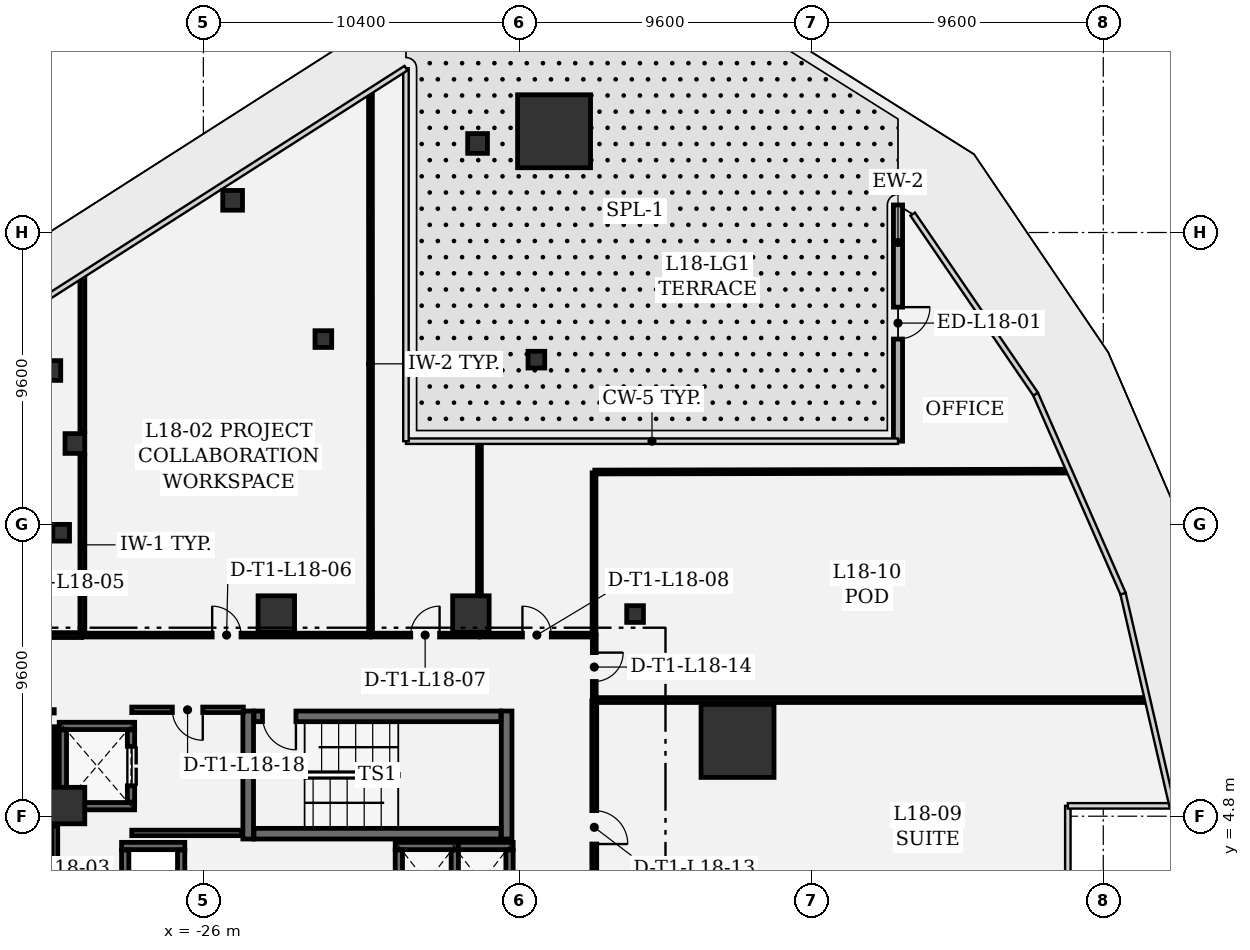
"""IFC4 building model, lengths in metres.
Left out: names, types, materials, properties, quantities, classifications, styles, units other than length and angle.
Written with IfcOpenShell. Run it as: python <this file> out.ifc"""

import sys

from ifc_helpers import new_model, si_unit, direction, frame, frame_2d, origin, origin_2d, place, context, subcontext, project, spatial, rectangle, extrude, element, fill, save


model = new_model("IFC4")
c1 = context("Model", 3, precision=1e-05, world=origin(), true_north=direction((0.0, 1.0)))
c2 = subcontext(c1, "Body", "Model", "MODEL_VIEW")
j1 = project(units=[si_unit("LENGTHUNIT", "METRE"), si_unit("PLANEANGLEUNIT", "RADIAN")], contexts=[c1])
p1 = place(None, origin())
s1 = spatial("IfcSite", under=j1, at=p1, CompositionType="ELEMENT")
p2 = place(p1, origin())
s2 = spatial("IfcBuilding", under=s1, at=p2, CompositionType="ELEMENT")
p3 = place(p2, frame((0.0, 0.0, 82.8)))
s3 = spatial("IfcBuildingStorey", under=s2, at=p3, CompositionType="ELEMENT", Elevation=82.8)
for number, where, z_axis, x_axis in (
    (1, (-8.43, 7.276, 0.0), (0.0, 0.0, 1.0), (1.0, 0.0, 0.0)),
    (2, (-14.464, 27.331, 0.0), (0.0, 0.0, 1.0), (1.0, 0.0, 0.0)),
):
    element("IfcColumn", number, at=place(p3, frame(where, z_axis=z_axis, x_axis=x_axis)), inside=s3, PredefinedType="COLUMN", context=c2, shape_type="SweptSolid", body=[
        extrude(rectangle(XDim=2.4, YDim=2.4, at=origin_2d()), origin(), (0.0, 0.0, 1.0), 4.2),
    ])
for number, where, z_axis, x_axis in (
    (3, (-23.6, 11.45, 0.0), (0.0, 0.0, 1.0), (1.0, 0.0, 0.0)),
    (4, (-17.2, 11.45, 0.0), (0.0, 0.0, 1.0), (1.0, 0.0, 0.0)),
    (5, (-30.5, 5.15, 0.0), (0.0, 0.0, 1.0), (1.0, 0.0, 0.0)),
):
    element("IfcColumn", number, at=place(p3, frame(where, z_axis=z_axis, x_axis=x_axis)), inside=s3, PredefinedType="COLUMN", context=c2, shape_type="SweptSolid", body=[
        extrude(rectangle(XDim=1.2, YDim=1.2, at=origin_2d()), origin(), (0.0, 0.0, 1.0), 4.2),
    ])
for number, where, z_axis, x_axis in (
    (6, (-25.038, 25.059, 0.0), (0.0, 0.0, 1.0), (1.0, 0.0, 0.0)),
    (7, (-31.016, 19.46, 0.0), (0.0, 0.0, 1.0), (1.0, 0.0, 0.0)),
    (8, (-16.981, 26.929, 0.0), (0.0, 0.0, 1.0), (1.0, 0.0, 0.0)),
    (9, (-30.225, 17.06, 0.0), (0.0, 0.0, 1.0), (1.0, 0.0, 0.0)),
):
    element("IfcColumn", number, at=place(p3, frame(where, z_axis=z_axis, x_axis=x_axis)), inside=s3, PredefinedType="COLUMN", context=c2, shape_type="SweptSolid", body=[
        extrude(rectangle(XDim=0.65, YDim=0.65, at=origin_2d()), origin(), (0.0, 0.0, 1.0), 4.2),
    ])
for number, where, z_axis, x_axis in (
    (10, (-22.053, 20.495, 0.0), (0.0, 0.0, 1.0), (1.0, 0.0, 0.0)),
    (11, (-30.677, 14.124, 0.0), (0.0, 0.0, 1.0), (1.0, 0.0, 0.0)),
    (12, (-15.046, 19.818, 0.0), (0.0, 0.0, 1.0), (1.0, 0.0, 0.0)),
    (13, (-11.8, 11.45, 0.0), (0.0, 0.0, 1.0), (1.0, 0.0, 0.0)),
):
    element("IfcColumn", number, at=place(p3, frame(where, z_axis=z_axis, x_axis=x_axis)), inside=s3, PredefinedType="COLUMN", context=c2, shape_type="SweptSolid", body=[
        extrude(rectangle(XDim=0.55, YDim=0.55, at=origin_2d()), origin(), (0.0, 0.0, 1.0), 4.2),
    ])
p4 = place(p3, frame((-3.152, 24.906, 0.0), z_axis=(0.0, 0.0, 1.0), x_axis=(0.0, -1.0, 0.0)))
e14 = element("IfcWall", 14, at=p4, inside=s3, PredefinedType="SOLIDWALL", context=c2, shape_type="SweptSolid", body=[
    extrude(rectangle(XDim=7.77, YDim=0.3, at=frame_2d((3.885, 0.0))), origin(), (0.0, 0.0, 1.0), 3.92),
])
p5 = place(p4, frame((3.36, 0.0, 0.0)))
e15 = element("IfcOpeningElement", 15, at=p5, cuts=e14, PredefinedType="OPENING", context=c2, shape_type="SweptSolid", body=[
    extrude(rectangle(XDim=1.05, YDim=2.2, at=frame_2d((0.525, 1.1))), frame((0.0, 0.16, 0.0), z_axis=(0.0, -1.0, 0.0), x_axis=(1.0, 0.0, 0.0)), (0.0, 0.0, 1.0), 0.32),
])
for number, where, z_axis, x_axis in (
    (16, (-24.525, 8.26, 0.0), (0.0, 0.0, 1.0), (0.0, -1.0, 0.0)),
    (17, (-16.025, 4.05, 0.0), (0.0, 0.0, 1.0), (0.0, 1.0, 0.0)),
):
    element("IfcWall", number, at=place(p3, frame(where, z_axis=z_axis, x_axis=x_axis)), inside=s3, PredefinedType="SHEAR", context=c2, shape_type="SweptSolid", body=[
        extrude(rectangle(XDim=4.21, YDim=0.35, at=frame_2d((2.105, 0.0))), origin(), (0.0, 0.0, 1.0), 3.92),
    ])
p6 = place(p3, frame((-24.335, 4.225, 0.0), z_axis=(0.0, 0.0, 1.0), x_axis=(1.0, 0.0, 0.0)))
e18 = element("IfcWall", 18, at=p6, inside=s3, PredefinedType="SHEAR", context=c2, shape_type="SweptSolid", body=[
    extrude(rectangle(XDim=8.12, YDim=0.35, at=frame_2d((4.06, 0.0))), origin(), (0.0, 0.0, 1.0), 3.92),
])
p7 = place(p3, frame((-16.215, 8.085, 0.0), z_axis=(0.0, 0.0, 1.0), x_axis=(-1.0, 0.0, 0.0)))
e19 = element("IfcWall", 19, at=p7, inside=s3, PredefinedType="SHEAR", context=c2, shape_type="SweptSolid", body=[
    extrude(rectangle(XDim=8.12, YDim=0.35, at=frame_2d((4.06, 0.0))), origin(), (0.0, 0.0, 1.0), 3.92),
])
p8 = place(p7, frame((6.74, 0.0, 0.0)))
e20 = element("IfcOpeningElement", 20, at=p8, cuts=e19, PredefinedType="OPENING", context=c2, shape_type="SweptSolid", body=[
    extrude(rectangle(XDim=1.1, YDim=2.2, at=frame_2d((0.55, 1.1))), frame((0.0, 0.185, 0.0), z_axis=(0.0, -1.0, 0.0), x_axis=(1.0, 0.0, 0.0)), (0.0, 0.0, 1.0), 0.37),
])
for number, where, z_axis, x_axis in (
    (21, (-28.26, 5.13, 0.0), (0.0, 0.0, 1.0), (-1.0, 0.0, 0.0)),
    (22, (-30.74, 7.77, 0.0), (0.0, 0.0, 1.0), (1.0, 0.0, 0.0)),
):
    element("IfcWall", number, at=place(p3, frame(where, z_axis=z_axis, x_axis=x_axis)), inside=s3, PredefinedType="SHEAR", context=c2, shape_type="SweptSolid", body=[
        extrude(rectangle(XDim=2.48, YDim=0.24, at=frame_2d((1.24, 0.0))), origin(), (0.0, 0.0, 1.0), 3.92),
    ])
p9 = place(p3, frame((-30.62, 5.262, 0.0), z_axis=(0.0, 0.0, 1.0), x_axis=(0.0, 1.0, 0.0)))
e23 = element("IfcWall", 23, at=p9, inside=s3, PredefinedType="SHEAR", context=c2, shape_type="SweptSolid", body=[
    extrude(rectangle(XDim=2.376, YDim=0.24, at=frame_2d((1.188, 0.0))), origin(), (0.0, 0.0, 1.0), 3.92),
])
p10 = place(p3, frame((-28.38, 7.638, 0.0), z_axis=(0.0, 0.0, 1.0), x_axis=(0.0, -1.0, 0.0)))
e24 = element("IfcWall", 24, at=p10, inside=s3, PredefinedType="SHEAR", context=c2, shape_type="SweptSolid", body=[
    extrude(rectangle(XDim=2.376, YDim=0.24, at=frame_2d((1.188, 0.0))), origin(), (0.0, 0.0, 1.0), 3.92),
])
p11 = place(p10, frame((0.538, 0.0, 0.0)))
e25 = element("IfcOpeningElement", 25, at=p11, cuts=e24, PredefinedType="OPENING", context=c2, shape_type="SweptSolid", body=[
    extrude(rectangle(XDim=1.3, YDim=2.3, at=frame_2d((0.65, 1.15))), frame((0.0, 0.13, 0.0), z_axis=(0.0, -1.0, 0.0), x_axis=(1.0, 0.0, 0.0)), (0.0, 0.0, 1.0), 0.26),
])
p12 = place(p3, frame((-28.69, 3.82, 0.0), z_axis=(0.0, 0.0, 1.0), x_axis=(1.0, 0.0, 0.0)))
e26 = element("IfcWall", 26, at=p12, inside=s3, PredefinedType="SHEAR", context=c2, shape_type="SweptSolid", body=[
    extrude(rectangle(XDim=2.08, YDim=0.24, at=frame_2d((1.04, 0.0))), origin(), (0.0, 0.0, 1.0), 3.92),
])
for number, where, z_axis, x_axis in (
    (27, (-28.57, 1.562, 0.0), (0.0, 0.0, 1.0), (0.0, 1.0, 0.0)),
    (28, (-26.73, 3.688, 0.0), (0.0, 0.0, 1.0), (0.0, -1.0, 0.0)),
):
    element("IfcWall", number, at=place(p3, frame(where, z_axis=z_axis, x_axis=x_axis)), inside=s3, PredefinedType="SHEAR", context=c2, shape_type="SweptSolid", body=[
        extrude(rectangle(XDim=2.126, YDim=0.24, at=frame_2d((1.063, 0.0))), origin(), (0.0, 0.0, 1.0), 3.92),
    ])
p13 = place(p3, frame((-19.69, 3.82, 0.0), z_axis=(0.0, 0.0, 1.0), x_axis=(1.0, 0.0, 0.0)))
e29 = element("IfcWall", 29, at=p13, inside=s3, PredefinedType="SHEAR", context=c2, shape_type="SweptSolid", body=[
    extrude(rectangle(XDim=2.08, YDim=0.24, at=frame_2d((1.04, 0.0))), origin(), (0.0, 0.0, 1.0), 3.92),
])
for number, where, z_axis, x_axis in (
    (30, (-19.57, 1.562, 0.0), (0.0, 0.0, 1.0), (0.0, 1.0, 0.0)),
    (31, (-17.73, 3.688, 0.0), (0.0, 0.0, 1.0), (0.0, -1.0, 0.0)),
):
    element("IfcWall", number, at=place(p3, frame(where, z_axis=z_axis, x_axis=x_axis)), inside=s3, PredefinedType="SHEAR", context=c2, shape_type="SweptSolid", body=[
        extrude(rectangle(XDim=2.126, YDim=0.24, at=frame_2d((1.063, 0.0))), origin(), (0.0, 0.0, 1.0), 3.92),
    ])
p14 = place(p3, frame((-17.61, 3.82, 0.0), z_axis=(0.0, 0.0, 1.0), x_axis=(1.0, 0.0, 0.0)))
e32 = element("IfcWall", 32, at=p14, inside=s3, PredefinedType="SHEAR", context=c2, shape_type="SweptSolid", body=[
    extrude(rectangle(XDim=1.8, YDim=0.24, at=frame_2d((0.9, 0.0))), origin(), (0.0, 0.0, 1.0), 3.92),
])
p15 = place(p3, frame((-15.93, 3.688, 0.0), z_axis=(0.0, 0.0, 1.0), x_axis=(0.0, -1.0, 0.0)))
e33 = element("IfcWall", 33, at=p15, inside=s3, PredefinedType="SHEAR", context=c2, shape_type="SweptSolid", body=[
    extrude(rectangle(XDim=2.126, YDim=0.24, at=frame_2d((1.063, 0.0))), origin(), (0.0, 0.0, 1.0), 3.92),
])
p16 = place(p3, frame((-28.355, 4.25, 0.0), z_axis=(0.0, 0.0, 1.0), x_axis=(1.0, 0.0, 0.0)))
e34 = element("IfcWall", 34, at=p16, inside=s3, PredefinedType="PARTITIONING", context=c2, shape_type="SweptSolid", body=[
    extrude(rectangle(XDim=3.622, YDim=0.18, at=frame_2d((1.811, 0.0))), origin(), (0.0, 0.0, 1.0), 3.92),
])
p17 = place(p3, frame((-24.684, 8.3, 0.0), z_axis=(0.0, 0.0, 1.0), x_axis=(-1.0, 0.0, 0.0)))
e35 = element("IfcWall", 35, at=p17, inside=s3, PredefinedType="PARTITIONING", context=c2, shape_type="SweptSolid", body=[
    extrude(rectangle(XDim=3.671, YDim=0.18, at=frame_2d((1.835, 0.0))), origin(), (0.0, 0.0, 1.0), 3.92),
])
p18 = place(p17, frame((1.335, 0.0, 0.0)))
e36 = element("IfcOpeningElement", 36, at=p18, cuts=e35, PredefinedType="OPENING", context=c2, shape_type="SweptSolid", body=[
    extrude(rectangle(XDim=1.0, YDim=2.15, at=frame_2d((0.5, 1.075))), frame((0.0, 0.1, 0.0), z_axis=(0.0, -1.0, 0.0), x_axis=(1.0, 0.0, 0.0)), (0.0, 0.0, 1.0), 0.2),
])
p19 = place(p3, frame((-30.88, 5.815, 0.0), z_axis=(0.0, 0.0, 1.0), x_axis=(0.0, 1.0, 0.0)))
e37 = element("IfcWall", 37, at=p19, inside=s3, PredefinedType="PARTITIONING", context=c2, shape_type="SweptSolid", body=[
    extrude(rectangle(XDim=1.928, YDim=0.11, at=frame_2d((0.964, 0.0))), origin(), (0.0, 0.0, 1.0), 3.92),
])
p20 = place(p3, frame((-30.905, 8.25, 0.0), z_axis=(0.0, 0.0, 1.0), x_axis=(-1.0, 0.0, 0.0)))
e38 = element("IfcWall", 38, at=p20, inside=s3, PredefinedType="PARTITIONING", context=c2, shape_type="SweptSolid", body=[
    extrude(rectangle(XDim=3.25, YDim=0.11, at=frame_2d((1.625, 0.0))), origin(), (0.0, 0.0, 1.0), 3.92),
])
p21 = place(p3, frame((-30.88, 1.625, 0.0), z_axis=(0.0, 0.0, 1.0), x_axis=(0.0, 1.0, 0.0)))
e39 = element("IfcWall", 39, at=p21, inside=s3, PredefinedType="PARTITIONING", context=c2, shape_type="SweptSolid", body=[
    extrude(rectangle(XDim=2.86, YDim=0.18, at=frame_2d((1.43, 0.0))), origin(), (0.0, 0.0, 1.0), 3.92),
])
p22 = place(p3, frame((-34.625, 10.758, 0.0), z_axis=(0.0, 0.0, 1.0), x_axis=(1.0, 0.0, 0.0)))
e40 = element("IfcWall", 40, at=p22, inside=s3, PredefinedType="PARTITIONING", context=c2, shape_type="SweptSolid", body=[
    extrude(rectangle(XDim=4.621, YDim=0.16, at=frame_2d((2.311, 0.0))), origin(), (0.0, 0.0, 1.0), 3.433),
])
p23 = place(p22, frame((1.76, 0.0, 0.0)))
e41 = element("IfcOpeningElement", 41, at=p23, cuts=e40, PredefinedType="OPENING", context=c2, shape_type="SweptSolid", body=[
    extrude(rectangle(XDim=1.1, YDim=2.15, at=frame_2d((0.55, 1.075))), frame((0.0, 0.09, 0.0), z_axis=(0.0, -1.0, 0.0), x_axis=(1.0, 0.0, 0.0)), (0.0, 0.0, 1.0), 0.18),
])
p24 = place(p3, frame((-29.979, 10.783, 0.0), z_axis=(0.0, 0.0, 1.0), x_axis=(0.0, 1.0, 0.0)))
e42 = element("IfcWall", 42, at=p24, inside=s3, PredefinedType="PARTITIONING", context=c2, shape_type="SweptSolid", body=[
    extrude(rectangle(XDim=5.886, YDim=0.16, at=frame_2d((2.943, 0.0))), origin(), (0.0, 0.0, 1.0), 3.92),
])
p25 = place(p3, frame((-29.979, 17.45, 0.0), z_axis=(0.0, 0.0, 1.0), x_axis=(0.0, 1.0, 0.0)))
e43 = element("IfcWall", 43, at=p25, inside=s3, PredefinedType="PARTITIONING", context=c2, shape_type="SweptSolid", body=[
    extrude(rectangle(XDim=5.073, YDim=0.16, at=frame_2d((2.537, 0.0))), origin(), (0.0, 0.0, 1.0), 3.92),
])
p26 = place(p3, frame((-29.946, 10.758, 0.0), z_axis=(0.0, 0.0, 1.0), x_axis=(1.0, 0.0, 0.0)))
e44 = element("IfcWall", 44, at=p26, inside=s3, PredefinedType="PARTITIONING", context=c2, shape_type="SweptSolid", body=[
    extrude(rectangle(XDim=9.421, YDim=0.125, at=frame_2d((4.711, 0.0))), origin(), (0.0, 0.0, 1.0), 3.92),
])
p27 = place(p26, frame((4.236, 0.0, 0.0)))
e45 = element("IfcOpeningElement", 45, at=p27, cuts=e44, PredefinedType="OPENING", context=c2, shape_type="SweptSolid", body=[
    extrude(rectangle(XDim=0.95, YDim=2.15, at=frame_2d((0.475, 1.075))), frame((0.0, 0.073, 0.0), z_axis=(0.0, -1.0, 0.0), x_axis=(1.0, 0.0, 0.0)), (0.0, 0.0, 1.0), 0.145),
])
p28 = place(p3, frame((-20.499, 10.783, 0.0), z_axis=(0.0, 0.0, 1.0), x_axis=(-0.000246947448, 0.999999969508, 0.0)))
e46 = element("IfcWall", 46, at=p28, inside=s3, PredefinedType="PARTITIONING", context=c2, shape_type="SweptSolid", body=[
    extrude(rectangle(XDim=17.795, YDim=0.125, at=frame_2d((8.898, 0.0))), origin(), (0.0, 0.0, 1.0), 2.957),
])
p29 = place(p3, frame((-20.466, 10.758, 0.0), z_axis=(0.0, 0.0, 1.0), x_axis=(1.0, 0.0, 0.0)))
e47 = element("IfcWall", 47, at=p29, inside=s3, PredefinedType="PARTITIONING", context=c2, shape_type="SweptSolid", body=[
    extrude(rectangle(XDim=3.523, YDim=0.125, at=frame_2d((1.761, 0.0))), origin(), (0.0, 0.0, 1.0), 3.92),
])
p30 = place(p29, frame((1.286, 0.0, 0.0)))
e48 = element("IfcOpeningElement", 48, at=p30, cuts=e47, PredefinedType="OPENING", context=c2, shape_type="SweptSolid", body=[
    extrude(rectangle(XDim=0.95, YDim=2.15, at=frame_2d((0.475, 1.075))), frame((0.0, 0.073, 0.0), z_axis=(0.0, -1.0, 0.0), x_axis=(1.0, 0.0, 0.0)), (0.0, 0.0, 1.0), 0.145),
])
p31 = place(p3, frame((-16.919, 12.115, 0.0), z_axis=(0.0, 0.0, 1.0), x_axis=(0.0, 1.0, 0.0)))
e49 = element("IfcWall", 49, at=p31, inside=s3, PredefinedType="PARTITIONING", context=c2, shape_type="SweptSolid", body=[
    extrude(rectangle(XDim=4.941, YDim=0.125, at=frame_2d((2.47, 0.0))), origin(), (0.0, 0.0, 1.0), 3.92),
])
p32 = place(p3, frame((-16.885, 10.758, 0.0), z_axis=(0.0, 0.0, 1.0), x_axis=(1.0, 0.0, 0.0)))
e50 = element("IfcWall", 50, at=p32, inside=s3, PredefinedType="PARTITIONING", context=c2, shape_type="SweptSolid", body=[
    extrude(rectangle(XDim=3.711, YDim=0.125, at=frame_2d((1.855, 0.0))), origin(), (0.0, 0.0, 1.0), 2.957),
])
p33 = place(p32, frame((1.38, 0.0, 0.0)))
e51 = element("IfcOpeningElement", 51, at=p33, cuts=e50, PredefinedType="OPENING", context=c2, shape_type="SweptSolid", body=[
    extrude(rectangle(XDim=0.95, YDim=2.15, at=frame_2d((0.475, 1.075))), frame((0.0, 0.073, 0.0), z_axis=(0.0, -1.0, 0.0), x_axis=(1.0, 0.0, 0.0)), (0.0, 0.0, 1.0), 0.145),
])
p34 = place(p3, frame((-13.15, 16.097, 0.0), z_axis=(0.0, 0.0, 1.0), x_axis=(0.0, -1.0, 0.0)))
e52 = element("IfcWall", 52, at=p34, inside=s3, PredefinedType="PARTITIONING", context=c2, shape_type="SweptSolid", body=[
    extrude(rectangle(XDim=5.314, YDim=0.125, at=frame_2d((2.657, 0.0))), origin(), (0.0, 0.0, 1.0), 3.92),
])
p35 = place(p3, frame((-13.125, 16.122, 0.0), z_axis=(0.0, 0.0, 1.0), x_axis=(0.999998337118, 0.001823666946, 0.0)))
e53 = element("IfcWall", 53, at=p35, inside=s3, PredefinedType="PARTITIONING", context=c2, shape_type="SweptSolid", body=[
    extrude(rectangle(XDim=15.529, YDim=0.125, at=frame_2d((7.765, 0.0))), origin(), (0.0, 0.0, 1.0), 3.92),
])
p36 = place(p3, frame((4.978, 8.621, 0.0), z_axis=(0.0, 0.0, 1.0), x_axis=(-1.0, 0.0, 0.0)))
e54 = element("IfcWall", 54, at=p36, inside=s3, PredefinedType="PARTITIONING", context=c2, shape_type="SweptSolid", body=[
    extrude(rectangle(XDim=18.095, YDim=0.16, at=frame_2d((9.047, 0.0))), origin(), (0.0, 0.0, 1.0), 2.957),
])
p37 = place(p3, frame((-13.142, 8.596, 0.0), z_axis=(0.0, 0.0, 1.0), x_axis=(0.0, -1.0, 0.0)))
e55 = element("IfcWall", 55, at=p37, inside=s3, PredefinedType="PARTITIONING", context=c2, shape_type="SweptSolid", body=[
    extrude(rectangle(XDim=8.322, YDim=0.16, at=frame_2d((4.161, 0.0))), origin(), (0.0, 0.0, 1.0), 3.92),
])
p38 = place(p37, frame((3.611, 0.0, 0.0)))
e56 = element("IfcOpeningElement", 56, at=p38, cuts=e55, PredefinedType="OPENING", context=c2, shape_type="SweptSolid", body=[
    extrude(rectangle(XDim=1.1, YDim=2.15, at=frame_2d((0.55, 1.075))), frame((0.0, 0.09, 0.0), z_axis=(0.0, -1.0, 0.0), x_axis=(1.0, 0.0, 0.0)), (0.0, 0.0, 1.0), 0.18),
])
p39 = place(p3, frame((-13.142, 10.758, 0.0), z_axis=(0.0, 0.0, 1.0), x_axis=(0.0, -1.0, 0.0)))
e57 = element("IfcWall", 57, at=p39, inside=s3, PredefinedType="PARTITIONING", context=c2, shape_type="SweptSolid", body=[
    extrude(rectangle(XDim=2.104, YDim=0.125, at=frame_2d((1.052, 0.0))), origin(), (0.0, 0.0, 1.0), 3.92),
])
p40 = place(p39, frame((0.577, 0.0, 0.0)))
e58 = element("IfcOpeningElement", 58, at=p40, cuts=e57, PredefinedType="OPENING", context=c2, shape_type="SweptSolid", body=[
    extrude(rectangle(XDim=0.95, YDim=2.15, at=frame_2d((0.475, 1.075))), frame((0.0, 0.073, 0.0), z_axis=(0.0, -1.0, 0.0), x_axis=(1.0, 0.0, 0.0)), (0.0, 0.0, 1.0), 0.145),
])
p41 = place(p5, origin())
e59 = element("IfcDoor", 59, at=p41, inside=s3, OperationType="SINGLE_SWING_LEFT", PredefinedType="DOOR", context=c2, shape_type="SweptSolid", body=[
    extrude(rectangle(XDim=1.05, YDim=2.2, at=frame_2d((0.525, 1.1))), frame((0.0, 0.025, 0.0), z_axis=(0.0, -1.0, 0.0), x_axis=(1.0, 0.0, 0.0)), (0.0, 0.0, 1.0), 0.05),
])
fill(e15, e59)
p42 = place(p8, origin())
e60 = element("IfcDoor", 60, at=p42, inside=s3, OperationType="SINGLE_SWING_LEFT", PredefinedType="DOOR", context=c2, shape_type="SweptSolid", body=[
    extrude(rectangle(XDim=1.1, YDim=2.2, at=frame_2d((0.55, 1.1))), frame((0.0, 0.025, 0.0), z_axis=(0.0, -1.0, 0.0), x_axis=(1.0, 0.0, 0.0)), (0.0, 0.0, 1.0), 0.05),
])
fill(e20, e60)
p43 = place(p11, origin())
e61 = element("IfcDoor", 61, at=p43, inside=s3, OperationType="DOUBLE_DOOR_SLIDING", PredefinedType="DOOR", context=c2, shape_type="SweptSolid", body=[
    extrude(rectangle(XDim=1.3, YDim=2.3, at=frame_2d((0.65, 1.15))), frame((0.0, 0.025, 0.0), z_axis=(0.0, -1.0, 0.0), x_axis=(1.0, 0.0, 0.0)), (0.0, 0.0, 1.0), 0.05),
])
fill(e25, e61)
p44 = place(p27, origin())
e62 = element("IfcDoor", 62, at=p44, inside=s3, OperationType="SINGLE_SWING_LEFT", PredefinedType="DOOR", context=c2, shape_type="SweptSolid", body=[
    extrude(rectangle(XDim=0.95, YDim=2.15, at=frame_2d((0.475, 1.075))), frame((0.0, 0.025, 0.0), z_axis=(0.0, -1.0, 0.0), x_axis=(1.0, 0.0, 0.0)), (0.0, 0.0, 1.0), 0.05),
])
fill(e45, e62)
p45 = place(p30, origin())
e63 = element("IfcDoor", 63, at=p45, inside=s3, OperationType="SINGLE_SWING_RIGHT", PredefinedType="DOOR", context=c2, shape_type="SweptSolid", body=[
    extrude(rectangle(XDim=0.95, YDim=2.15, at=frame_2d((0.475, 1.075))), frame((0.0, 0.025, 0.0), z_axis=(0.0, -1.0, 0.0), x_axis=(1.0, 0.0, 0.0)), (0.0, 0.0, 1.0), 0.05),
])
fill(e48, e63)
p46 = place(p33, origin())
e64 = element("IfcDoor", 64, at=p46, inside=s3, OperationType="SINGLE_SWING_LEFT", PredefinedType="DOOR", context=c2, shape_type="SweptSolid", body=[
    extrude(rectangle(XDim=0.95, YDim=2.15, at=frame_2d((0.475, 1.075))), frame((0.0, 0.025, 0.0), z_axis=(0.0, -1.0, 0.0), x_axis=(1.0, 0.0, 0.0)), (0.0, 0.0, 1.0), 0.05),
])
fill(e51, e64)
p47 = place(p38, origin())
e65 = element("IfcDoor", 65, at=p47, inside=s3, OperationType="SINGLE_SWING_RIGHT", PredefinedType="DOOR", context=c2, shape_type="SweptSolid", body=[
    extrude(rectangle(XDim=1.1, YDim=2.15, at=frame_2d((0.55, 1.075))), frame((0.0, 0.025, 0.0), z_axis=(0.0, -1.0, 0.0), x_axis=(1.0, 0.0, 0.0)), (0.0, 0.0, 1.0), 0.05),
])
fill(e56, e65)
p48 = place(p40, origin())
e66 = element("IfcDoor", 66, at=p48, inside=s3, OperationType="SINGLE_SWING_LEFT", PredefinedType="DOOR", context=c2, shape_type="SweptSolid", body=[
    extrude(rectangle(XDim=0.95, YDim=2.15, at=frame_2d((0.475, 1.075))), frame((0.0, 0.025, 0.0), z_axis=(0.0, -1.0, 0.0), x_axis=(1.0, 0.0, 0.0)), (0.0, 0.0, 1.0), 0.05),
])
fill(e58, e66)
p49 = place(p18, origin())
e67 = element("IfcDoor", 67, at=p49, inside=s3, OperationType="SINGLE_SWING_LEFT", PredefinedType="DOOR", context=c2, shape_type="SweptSolid", body=[
    extrude(rectangle(XDim=1.0, YDim=2.15, at=frame_2d((0.5, 1.075))), frame((0.0, 0.025, 0.0), z_axis=(0.0, -1.0, 0.0), x_axis=(1.0, 0.0, 0.0)), (0.0, 0.0, 1.0), 0.05),
])
fill(e36, e67)
save(model, sys.argv[1])
